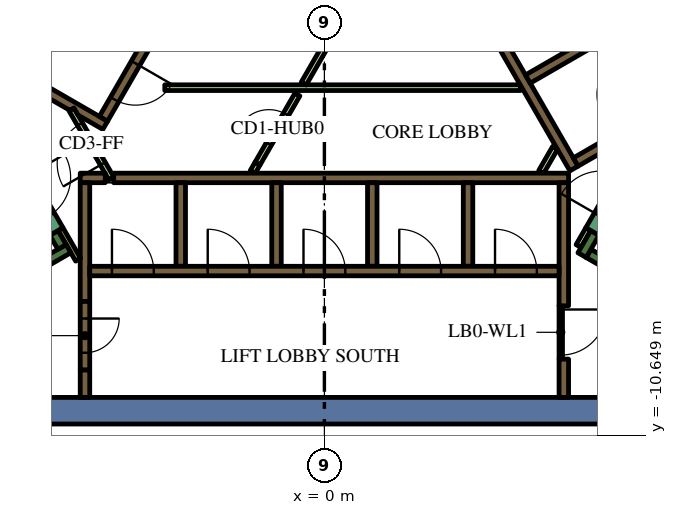
"""IFC4 building model, lengths in metres.
Left out: names, types, materials, properties, quantities, classifications, styles, units other than length and angle.
Written with IfcOpenShell. Run it as: python <this file> out.ifc"""

import sys

from ifc_helpers import new_model, si_unit, direction, frame, frame_2d, origin, place, context, subcontext, project, spatial, polyline, rectangle, outline, extrude, element, fill, save


model = new_model("IFC4")
c1 = context("Model", 3, precision=1e-05, world=origin(), true_north=direction((0.0, 1.0)))
c2 = subcontext(c1, "Body", "Model", "MODEL_VIEW")
j1 = project(units=[si_unit("LENGTHUNIT", "METRE"), si_unit("PLANEANGLEUNIT", "RADIAN")], contexts=[c1])
p1 = place(None, origin())
s1 = spatial("IfcSite", under=j1, at=p1, CompositionType="ELEMENT")
p2 = place(p1, origin())
s2 = spatial("IfcBuilding", under=s1, at=p2, CompositionType="ELEMENT")
p3 = place(p2, frame((0.0, 0.0, 247.8)))
s3 = spatial("IfcBuildingStorey", under=s2, at=p3, CompositionType="ELEMENT", Elevation=247.8)
p4 = place(p3, frame((8.904, -10.0, 0.0), z_axis=(0.0, 0.0, 1.0), x_axis=(-1.0, 0.0, 0.0)))
e1 = element("IfcWall", 1, at=p4, inside=s3, PredefinedType="SOLIDWALL", context=c2, shape_type="SweptSolid", body=[
    extrude(rectangle(XDim=22.226, YDim=0.7, at=frame_2d((11.113, 0.0))), origin(), (0.0, 0.0, 1.0), 4.2),
])
p5 = place(p3, frame((-12.625, -1.867, 0.0), z_axis=(0.0, 0.0, 1.0), x_axis=(0.499996974394, 0.866027150612, 0.0)))
e2 = element("IfcWall", 2, at=p5, inside=s3, PredefinedType="SOLIDWALL", context=c2, shape_type="SweptSolid", body=[
    extrude(rectangle(XDim=15.858, YDim=0.7, at=frame_2d((7.929, 0.0))), origin(), (0.0, 0.0, 1.0), 4.2),
])
p6 = place(p3, frame((12.84, -9.261, 0.0), z_axis=(0.0, 0.0, 1.0), x_axis=(-0.866013990052, 0.500019768644, 0.0)))
e3 = element("IfcWall", 3, at=p6, inside=s3, PredefinedType="SOLIDWALL", context=c2, shape_type="SweptSolid", body=[
    extrude(rectangle(XDim=6.8, YDim=0.25, at=frame_2d((3.4, 0.0))), origin(), (0.0, 0.0, 1.0), 4.2),
])
p7 = place(p3, frame((6.78, -5.906, 0.0), z_axis=(0.0, 0.0, 1.0), x_axis=(0.500223362819, 0.865896406789, 0.0)))
e4 = element("IfcWall", 4, at=p7, inside=s3, PredefinedType="SOLIDWALL", context=c2, shape_type="SweptSolid", body=[
    extrude(rectangle(XDim=0.675, YDim=0.25, at=frame_2d((0.337, 0.0))), origin(), (0.0, 0.0, 1.0), 4.2),
])
p8 = place(p3, frame((-12.84, -9.261, 0.0), z_axis=(0.0, 0.0, 1.0), x_axis=(0.866016039709, 0.500016218704, 0.0)))
e5 = element("IfcWall", 5, at=p8, inside=s3, PredefinedType="SOLIDWALL", context=c2, shape_type="SweptSolid", body=[
    extrude(rectangle(XDim=7.05, YDim=0.25, at=frame_2d((3.525, 0.0))), origin(), (0.0, 0.0, 1.0), 4.2),
])
p9 = place(p3, frame((-6.905, -5.69, 0.0), z_axis=(0.0, 0.0, 1.0), x_axis=(-0.500402024738, 0.865793170242, 0.0)))
e6 = element("IfcWall", 6, at=p9, inside=s3, PredefinedType="SOLIDWALL", context=c2, shape_type="SweptSolid", body=[
    extrude(rectangle(XDim=0.425, YDim=0.25, at=frame_2d((0.212, 0.0))), origin(), (0.0, 0.0, 1.0), 4.2),
])
p10 = place(p3, frame((-6.3, -8.925, 0.0), z_axis=(0.0, 0.0, 1.0), x_axis=(0.0, -1.0, 0.0)))
e7 = element("IfcWall", 7, at=p10, inside=s3, PredefinedType="SOLIDWALL", context=c2, shape_type="SweptSolid", body=[
    extrude(rectangle(XDim=0.725, YDim=0.25, at=frame_2d((0.363, 0.0))), origin(), (0.0, 0.0, 1.0), 4.2),
])
p11 = place(p3, frame((-5.545, -3.875, 0.0), z_axis=(0.0, 0.0, 1.0), x_axis=(1.0, 0.0, 0.0)))
e8 = element("IfcWall", 8, at=p11, inside=s3, PredefinedType="SOLIDWALL", context=c2, shape_type="SweptSolid", body=[
    extrude(rectangle(XDim=11.97, YDim=0.25, at=frame_2d((5.985, 0.0))), origin(), (0.0, 0.0, 1.0), 4.2),
])
p12 = place(p3, frame((-6.425, -3.875, 0.0), z_axis=(0.0, 0.0, 1.0), x_axis=(1.0, 0.0, 0.0)))
e9 = element("IfcWall", 9, at=p12, inside=s3, PredefinedType="SOLIDWALL", context=c2, shape_type="SweptSolid", body=[
    extrude(rectangle(XDim=0.658, YDim=0.25, at=frame_2d((0.329, 0.0))), origin(), (0.0, 0.0, 1.0), 4.2),
])
p13 = place(p3, frame((6.3, -7.24, 0.0), z_axis=(0.0, 0.0, 1.0), x_axis=(0.0, 1.0, 0.0)))
e10 = element("IfcWall", 10, at=p13, inside=s3, PredefinedType="SOLIDWALL", context=c2, shape_type="SweptSolid", body=[
    extrude(rectangle(XDim=3.24, YDim=0.25, at=frame_2d((1.62, 0.0))), origin(), (0.0, 0.0, 1.0), 4.2),
])
p14 = place(p3, frame((6.3, -9.65, 0.0), z_axis=(0.0, 0.0, 1.0), x_axis=(0.0, 1.0, 0.0)))
e11 = element("IfcWall", 11, at=p14, inside=s3, PredefinedType="SOLIDWALL", context=c2, shape_type="SweptSolid", body=[
    extrude(rectangle(XDim=1.008, YDim=0.25, at=frame_2d((0.504, 0.0))), origin(), (0.0, 0.0, 1.0), 4.2),
])
for number, where, z_axis, x_axis in (
    (12, (3.78, -4.0, 0.0), (0.0, 0.0, 1.0), (0.0, -1.0, 0.0)),
    (13, (1.26, -4.0, 0.0), (0.0, 0.0, 1.0), (0.0, -1.0, 0.0)),
    (14, (-1.26, -4.0, 0.0), (0.0, 0.0, 1.0), (0.0, -1.0, 0.0)),
    (15, (-3.78, -4.0, 0.0), (0.0, 0.0, 1.0), (0.0, -1.0, 0.0)),
):
    element("IfcWall", number, at=place(p3, frame(where, z_axis=z_axis, x_axis=x_axis)), inside=s3, PredefinedType="SOLIDWALL", context=c2, shape_type="SweptSolid", body=[
        extrude(rectangle(XDim=2.2, YDim=0.25, at=frame_2d((1.1, 0.0))), origin(), (0.0, 0.0, 1.0), 4.2),
    ])
p15 = place(p3, frame((-6.3, -7.125, 0.0), z_axis=(0.0, 0.0, 1.0), x_axis=(0.0, 1.0, 0.0)))
e16 = element("IfcWall", 16, at=p15, inside=s3, PredefinedType="SOLIDWALL", context=c2, shape_type="SweptSolid", body=[
    extrude(rectangle(XDim=3.125, YDim=0.25, at=frame_2d((1.562, 0.0))), origin(), (0.0, 0.0, 1.0), 4.2),
])
p16 = place(p3, frame((6.568, -3.627, 0.0), z_axis=(0.0, 0.0, 1.0), x_axis=(-0.499999455981, 0.866025717874, 0.0)))
e17 = element("IfcWall", 17, at=p16, inside=s3, PredefinedType="SOLIDWALL", context=c2, shape_type="SweptSolid", body=[
    extrude(rectangle(XDim=11.978, YDim=0.25, at=frame_2d((5.989, 0.0))), origin(), (0.0, 0.0, 1.0), 4.2),
])
p17 = place(p3, frame((5.354, -1.274, 0.0), z_axis=(0.0, 0.0, 1.0), x_axis=(0.866008176907, 0.50002983664, 0.0)))
e18 = element("IfcWall", 18, at=p17, inside=s3, PredefinedType="SOLIDWALL", context=c2, shape_type="SweptSolid", body=[
    extrude(rectangle(XDim=2.2, YDim=0.25, at=frame_2d((1.1, 0.0))), origin(), (0.0, 0.0, 1.0), 4.2),
])
p18 = place(p3, frame((6.614, -3.456, 0.0), z_axis=(0.0, 0.0, 1.0), x_axis=(0.866025089694, 0.500000544019, 0.0)))
e19 = element("IfcWall", 19, at=p18, inside=s3, PredefinedType="SOLIDWALL", context=c2, shape_type="SweptSolid", body=[
    extrude(rectangle(XDim=2.305, YDim=0.25, at=frame_2d((1.153, 0.0))), origin(), (0.0, 0.0, 1.0), 4.2),
])
p19 = place(p3, frame((-8.06, -1.311, 0.0), z_axis=(0.0, 0.0, 1.0), x_axis=(0.50000273126, 0.866023826885, 0.0)))
e20 = element("IfcWall", 20, at=p19, inside=s3, PredefinedType="SOLIDWALL", context=c2, shape_type="SweptSolid", body=[
    extrude(rectangle(XDim=10.33, YDim=0.25, at=frame_2d((5.165, 0.0))), origin(), (0.0, 0.0, 1.0), 4.2),
])
p20 = place(p3, origin())
e21 = element("IfcWall", 21, at=p20, inside=s3, PredefinedType="SOLIDWALL", context=c2, shape_type="SweptSolid", body=[
    extrude(outline(polyline([(-5.922, -2.257), (-5.922, -2.257), (-5.705, -2.382), (-5.83, -2.598), (-6.483, -2.221), (-6.591, -2.033), (-6.591, -2.033), (-6.7, -2.096), (-7.952, -1.373), (-7.827, -1.156), (-5.922, -2.257)])), origin(), (0.0, 0.0, 1.0), 4.2),
])
p21 = place(p3, frame((-6.48, -6.027, 0.0), z_axis=(0.0, 0.0, 1.0), x_axis=(-0.499927229454, 0.866067413802, 0.0)))
e22 = element("IfcWall", 22, at=p21, inside=s3, PredefinedType="PARTITIONING", context=c2, shape_type="SweptSolid", body=[
    extrude(rectangle(XDim=0.929, YDim=0.15, at=frame_2d((0.464, 0.0))), origin(), (0.0, 0.0, 1.0), 4.2),
])
p22 = place(p3, frame((6.945, -5.222, 0.0), z_axis=(0.0, 0.0, 1.0), x_axis=(-0.499818422106, -0.866130212453, 0.0)))
e23 = element("IfcWall", 23, at=p22, inside=s3, PredefinedType="PARTITIONING", context=c2, shape_type="SweptSolid", body=[
    extrude(rectangle(XDim=0.514, YDim=0.15, at=frame_2d((0.257, 0.0))), origin(), (0.0, 0.0, 1.0), 3.45),
])
p23 = place(p3, frame((5.705, -3.718, 0.0), z_axis=(0.0, 0.0, 1.0), x_axis=(0.499962090823, 0.866047289552, 0.0)))
e24 = element("IfcWall", 24, at=p23, inside=s3, PredefinedType="PARTITIONING", context=c2, shape_type="SweptSolid", body=[
    extrude(rectangle(XDim=0.735, YDim=0.15, at=frame_2d((0.367, 0.0))), origin(), (0.0, 0.0, 1.0), 3.45),
])
p24 = place(p3, frame((-4.2, -1.5, 0.0), z_axis=(0.0, 0.0, 1.0), x_axis=(1.0, 0.0, 0.0)))
e25 = element("IfcWall", 25, at=p24, inside=s3, PredefinedType="PARTITIONING", context=c2, shape_type="SweptSolid", body=[
    extrude(rectangle(XDim=9.359, YDim=0.15, at=frame_2d((4.68, 0.0))), origin(), (0.0, 0.0, 1.0), 3.45),
])
p25 = place(p3, frame((-0.544, -1.393, 0.0), z_axis=(0.0, 0.0, 1.0), x_axis=(0.499928740635, 0.866066541489, 0.0)))
e26 = element("IfcWall", 26, at=p25, inside=s3, PredefinedType="PARTITIONING", context=c2, shape_type="SweptSolid", body=[
    extrude(rectangle(XDim=1.912, YDim=0.15, at=frame_2d((0.956, 0.0))), origin(), (0.0, 0.0, 1.0), 3.45),
])
p26 = place(p3, frame((-1.887, -3.718, 0.0), z_axis=(0.0, 0.0, 1.0), x_axis=(0.500165633897, 0.865929753888, 0.0)))
e27 = element("IfcWall", 27, at=p26, inside=s3, PredefinedType="PARTITIONING", context=c2, shape_type="SweptSolid", body=[
    extrude(rectangle(XDim=0.254, YDim=0.15, at=frame_2d((0.127, 0.0))), origin(), (0.0, 0.0, 1.0), 3.45),
])
p27 = place(p3, frame((-6.175, -6.325, 0.0), z_axis=(0.0, 0.0, 1.0), x_axis=(1.0, 0.0, 0.0)))
e28 = element("IfcWall", 28, at=p27, inside=s3, PredefinedType="SOLIDWALL", context=c2, shape_type="SweptSolid", body=[
    extrude(rectangle(XDim=12.35, YDim=0.25, at=frame_2d((6.175, 0.0))), origin(), (0.0, 0.0, 1.0), 4.2),
])
p28 = place(p27, frame((0.585, 0.0, 0.0)))
e29 = element("IfcOpeningElement", 29, at=p28, cuts=e28, PredefinedType="OPENING", context=c2, shape_type="SweptSolid", body=[
    extrude(rectangle(XDim=1.1, YDim=2.1, at=frame_2d((0.55, 1.05))), frame((0.0, 0.135, 0.0), z_axis=(0.0, -1.0, 0.0), x_axis=(1.0, 0.0, 0.0)), (0.0, 0.0, 1.0), 0.27),
])
p29 = place(p27, frame((3.105, 0.0, 0.0)))
e30 = element("IfcOpeningElement", 30, at=p29, cuts=e28, PredefinedType="OPENING", context=c2, shape_type="SweptSolid", body=[
    extrude(rectangle(XDim=1.1, YDim=2.1, at=frame_2d((0.55, 1.05))), frame((0.0, 0.135, 0.0), z_axis=(0.0, -1.0, 0.0), x_axis=(1.0, 0.0, 0.0)), (0.0, 0.0, 1.0), 0.27),
])
p30 = place(p27, frame((5.625, 0.0, 0.0)))
e31 = element("IfcOpeningElement", 31, at=p30, cuts=e28, PredefinedType="OPENING", context=c2, shape_type="SweptSolid", body=[
    extrude(rectangle(XDim=1.1, YDim=2.1, at=frame_2d((0.55, 1.05))), frame((0.0, 0.135, 0.0), z_axis=(0.0, -1.0, 0.0), x_axis=(1.0, 0.0, 0.0)), (0.0, 0.0, 1.0), 0.27),
])
p31 = place(p27, frame((8.145, 0.0, 0.0)))
e32 = element("IfcOpeningElement", 32, at=p31, cuts=e28, PredefinedType="OPENING", context=c2, shape_type="SweptSolid", body=[
    extrude(rectangle(XDim=1.1, YDim=2.1, at=frame_2d((0.55, 1.05))), frame((0.0, 0.135, 0.0), z_axis=(0.0, -1.0, 0.0), x_axis=(1.0, 0.0, 0.0)), (0.0, 0.0, 1.0), 0.27),
])
p32 = place(p27, frame((10.665, 0.0, 0.0)))
e33 = element("IfcOpeningElement", 33, at=p32, cuts=e28, PredefinedType="OPENING", context=c2, shape_type="SweptSolid", body=[
    extrude(rectangle(XDim=1.1, YDim=2.1, at=frame_2d((0.55, 1.05))), frame((0.0, 0.135, 0.0), z_axis=(0.0, -1.0, 0.0), x_axis=(1.0, 0.0, 0.0)), (0.0, 0.0, 1.0), 0.27),
])
p33 = place(p3, frame((8.565, -2.185, 0.0), z_axis=(0.0, 0.0, 1.0), x_axis=(-0.499997954832, 0.866026584559, 0.0)))
e34 = element("IfcWall", 34, at=p33, inside=s3, PredefinedType="SOLIDWALL", context=c2, shape_type="SweptSolid", body=[
    extrude(rectangle(XDim=12.35, YDim=0.25, at=frame_2d((6.175, 0.0))), origin(), (0.0, 0.0, 1.0), 4.2),
])
p34 = place(p33, frame((0.585, 0.0, 0.0)))
e35 = element("IfcOpeningElement", 35, at=p34, cuts=e34, PredefinedType="OPENING", context=c2, shape_type="SweptSolid", body=[
    extrude(rectangle(XDim=1.1, YDim=2.1, at=frame_2d((0.55, 1.05))), frame((0.0, 0.135, 0.0), z_axis=(0.0, -1.0, 0.0), x_axis=(1.0, 0.0, 0.0)), (0.0, 0.0, 1.0), 0.27),
])
p35 = place(p3, frame((-0.898, 6.194, 0.0), z_axis=(0.0, 0.0, 1.0), x_axis=(-0.499996202215, -0.866027596426, 0.0)))
e36 = element("IfcWall", 36, at=p35, inside=s3, PredefinedType="SOLIDWALL", context=c2, shape_type="SweptSolid", body=[
    extrude(rectangle(XDim=9.83, YDim=0.25, at=frame_2d((4.915, 0.0))), origin(), (0.0, 0.0, 1.0), 4.2),
])
p36 = place(p35, frame((0.585, 0.0, 0.0)))
e37 = element("IfcOpeningElement", 37, at=p36, cuts=e36, PredefinedType="OPENING", context=c2, shape_type="SweptSolid", body=[
    extrude(rectangle(XDim=1.1, YDim=2.1, at=frame_2d((0.55, 1.05))), frame((0.0, 0.135, 0.0), z_axis=(0.0, -1.0, 0.0), x_axis=(1.0, 0.0, 0.0)), (0.0, 0.0, 1.0), 0.27),
])
p37 = place(p35, frame((3.105, 0.0, 0.0)))
e38 = element("IfcOpeningElement", 38, at=p37, cuts=e36, PredefinedType="OPENING", context=c2, shape_type="SweptSolid", body=[
    extrude(rectangle(XDim=1.1, YDim=2.1, at=frame_2d((0.55, 1.05))), frame((0.0, 0.135, 0.0), z_axis=(0.0, -1.0, 0.0), x_axis=(1.0, 0.0, 0.0)), (0.0, 0.0, 1.0), 0.27),
])
p38 = place(p35, frame((5.625, 0.0, 0.0)))
e39 = element("IfcOpeningElement", 39, at=p38, cuts=e36, PredefinedType="OPENING", context=c2, shape_type="SweptSolid", body=[
    extrude(rectangle(XDim=1.1, YDim=2.1, at=frame_2d((0.55, 1.05))), frame((0.0, 0.135, 0.0), z_axis=(0.0, -1.0, 0.0), x_axis=(1.0, 0.0, 0.0)), (0.0, 0.0, 1.0), 0.27),
])
p39 = place(p35, frame((8.145, 0.0, 0.0)))
e40 = element("IfcOpeningElement", 40, at=p39, cuts=e36, PredefinedType="OPENING", context=c2, shape_type="SweptSolid", body=[
    extrude(rectangle(XDim=1.1, YDim=2.1, at=frame_2d((0.55, 1.05))), frame((0.0, 0.135, 0.0), z_axis=(0.0, -1.0, 0.0), x_axis=(1.0, 0.0, 0.0)), (0.0, 0.0, 1.0), 0.27),
])
p40 = place(p3, frame((7.053, -5.284, 0.0), z_axis=(0.0, 0.0, 1.0), x_axis=(0.500078061341, 0.865980330357, 0.0)))
e41 = element("IfcWall", 41, at=p40, inside=s3, PredefinedType="SOLIDWALL", context=c2, shape_type="SweptSolid", body=[
    extrude(rectangle(XDim=2.1, YDim=0.4, at=frame_2d((1.05, 0.0))), origin(), (0.0, 0.0, 1.0), 4.2),
])
p41 = place(p40, frame((0.45, 0.0, 0.0)))
e42 = element("IfcOpeningElement", 42, at=p41, cuts=e41, PredefinedType="OPENING", context=c2, shape_type="SweptSolid", body=[
    extrude(rectangle(XDim=1.2, YDim=2.1, at=frame_2d((0.6, 1.05))), frame((0.0, 0.21, 0.0), z_axis=(0.0, -1.0, 0.0), x_axis=(1.0, 0.0, 0.0)), (0.0, 0.0, 1.0), 0.42),
])
p42 = place(p3, frame((-8.103, -3.466, 0.0), z_axis=(0.0, 0.0, 1.0), x_axis=(0.500078061341, -0.865980330357, 0.0)))
e43 = element("IfcWall", 43, at=p42, inside=s3, PredefinedType="SOLIDWALL", context=c2, shape_type="SweptSolid", body=[
    extrude(rectangle(XDim=2.1, YDim=0.4, at=frame_2d((1.05, 0.0))), origin(), (0.0, 0.0, 1.0), 4.2),
])
p43 = place(p42, frame((0.45, 0.0, 0.0)))
e44 = element("IfcOpeningElement", 44, at=p43, cuts=e43, PredefinedType="OPENING", context=c2, shape_type="SweptSolid", body=[
    extrude(rectangle(XDim=1.2, YDim=2.1, at=frame_2d((0.6, 1.05))), frame((0.0, 0.21, 0.0), z_axis=(0.0, -1.0, 0.0), x_axis=(1.0, 0.0, 0.0)), (0.0, 0.0, 1.0), 0.42),
])
p44 = place(p3, frame((-6.3, -7.125, 0.0), z_axis=(0.0, 0.0, 1.0), x_axis=(0.0, -1.0, 0.0)))
e45 = element("IfcWall", 45, at=p44, inside=s3, PredefinedType="SOLIDWALL", context=c2, shape_type="SweptSolid", body=[
    extrude(rectangle(XDim=1.8, YDim=0.25, at=frame_2d((0.9, 0.0))), origin(), (0.0, 0.0, 1.0), 4.2),
])
p45 = place(p44, frame((0.45, 0.0, 0.0)))
e46 = element("IfcOpeningElement", 46, at=p45, cuts=e45, PredefinedType="OPENING", context=c2, shape_type="SweptSolid", body=[
    extrude(rectangle(XDim=0.9, YDim=2.1, at=frame_2d((0.45, 1.05))), frame((0.0, 0.135, 0.0), z_axis=(0.0, -1.0, 0.0), x_axis=(1.0, 0.0, 0.0)), (0.0, 0.0, 1.0), 0.27),
])
p46 = place(p3, frame((-1.76, -3.498, 0.0), z_axis=(0.0, 0.0, 1.0), x_axis=(0.499977374825, 0.866038466041, 0.0)))
e47 = element("IfcWall", 47, at=p46, inside=s3, PredefinedType="PARTITIONING", context=c2, shape_type="SweptSolid", body=[
    extrude(rectangle(XDim=2.1, YDim=0.15, at=frame_2d((1.05, 0.0))), origin(), (0.0, 0.0, 1.0), 3.45),
])
p47 = place(p46, frame((0.6, 0.0, 0.0)))
e48 = element("IfcOpeningElement", 48, at=p47, cuts=e47, PredefinedType="OPENING", context=c2, shape_type="SweptSolid", body=[
    extrude(rectangle(XDim=0.9, YDim=2.1, at=frame_2d((0.45, 1.05))), frame((0.0, 0.085, 0.0), z_axis=(0.0, -1.0, 0.0), x_axis=(1.0, 0.0, 0.0)), (0.0, 0.0, 1.0), 0.17),
])
p48 = place(p3, frame((-5.606, -3.89, 0.0), z_axis=(0.0, 0.0, 1.0), x_axis=(-0.500027713859, 0.866009402589, 0.0)))
e49 = element("IfcWall", 49, at=p48, inside=s3, PredefinedType="PARTITIONING", context=c2, shape_type="SweptSolid", body=[
    extrude(rectangle(XDim=2.1, YDim=0.15, at=frame_2d((1.05, 0.0))), origin(), (0.0, 0.0, 1.0), 3.45),
])
p49 = place(p48, frame((0.45, 0.0, 0.0)))
e50 = element("IfcOpeningElement", 50, at=p49, cuts=e49, PredefinedType="OPENING", context=c2, shape_type="SweptSolid", body=[
    extrude(rectangle(XDim=1.2, YDim=2.1, at=frame_2d((0.6, 1.05))), frame((0.0, 0.085, 0.0), z_axis=(0.0, -1.0, 0.0), x_axis=(1.0, 0.0, 0.0)), (0.0, 0.0, 1.0), 0.17),
])
p50 = place(p3, frame((6.22, -7.237, 0.0), z_axis=(0.0, 0.0, 1.0), x_axis=(0.0, -1.0, 0.0)))
e51 = element("IfcWall", 51, at=p50, inside=s3, PredefinedType="PARTITIONING", context=c2, shape_type="SweptSolid", body=[
    extrude(rectangle(XDim=1.4, YDim=0.09, at=frame_2d((0.7, 0.0))), origin(), (0.0, 0.0, 1.0), 3.45),
])
p51 = place(p50, frame((0.1, 0.0, 0.0)))
e52 = element("IfcOpeningElement", 52, at=p51, cuts=e51, PredefinedType="OPENING", context=c2, shape_type="SweptSolid", body=[
    extrude(rectangle(XDim=1.2, YDim=2.1, at=frame_2d((0.6, 1.05))), frame((0.0, 0.055, 0.0), z_axis=(0.0, -1.0, 0.0), x_axis=(1.0, 0.0, 0.0)), (0.0, 0.0, 1.0), 0.11),
])
p52 = place(p28, origin())
e53 = element("IfcDoor", 53, at=p52, inside=s3, OperationType="DOUBLE_DOOR_SLIDING", PredefinedType="DOOR", context=c2, shape_type="SweptSolid", body=[
    extrude(rectangle(XDim=1.1, YDim=2.1, at=frame_2d((0.55, 1.05))), frame((0.0, 0.025, 0.0), z_axis=(0.0, -1.0, 0.0), x_axis=(1.0, 0.0, 0.0)), (0.0, 0.0, 1.0), 0.05),
])
fill(e29, e53)
p53 = place(p29, origin())
e54 = element("IfcDoor", 54, at=p53, inside=s3, OperationType="DOUBLE_DOOR_SLIDING", PredefinedType="DOOR", context=c2, shape_type="SweptSolid", body=[
    extrude(rectangle(XDim=1.1, YDim=2.1, at=frame_2d((0.55, 1.05))), frame((0.0, 0.025, 0.0), z_axis=(0.0, -1.0, 0.0), x_axis=(1.0, 0.0, 0.0)), (0.0, 0.0, 1.0), 0.05),
])
fill(e30, e54)
p54 = place(p30, origin())
e55 = element("IfcDoor", 55, at=p54, inside=s3, OperationType="DOUBLE_DOOR_SLIDING", PredefinedType="DOOR", context=c2, shape_type="SweptSolid", body=[
    extrude(rectangle(XDim=1.1, YDim=2.1, at=frame_2d((0.55, 1.05))), frame((0.0, 0.025, 0.0), z_axis=(0.0, -1.0, 0.0), x_axis=(1.0, 0.0, 0.0)), (0.0, 0.0, 1.0), 0.05),
])
fill(e31, e55)
p55 = place(p31, origin())
e56 = element("IfcDoor", 56, at=p55, inside=s3, OperationType="DOUBLE_DOOR_SLIDING", PredefinedType="DOOR", context=c2, shape_type="SweptSolid", body=[
    extrude(rectangle(XDim=1.1, YDim=2.1, at=frame_2d((0.55, 1.05))), frame((0.0, 0.025, 0.0), z_axis=(0.0, -1.0, 0.0), x_axis=(1.0, 0.0, 0.0)), (0.0, 0.0, 1.0), 0.05),
])
fill(e32, e56)
p56 = place(p32, origin())
e57 = element("IfcDoor", 57, at=p56, inside=s3, OperationType="DOUBLE_DOOR_SLIDING", PredefinedType="DOOR", context=c2, shape_type="SweptSolid", body=[
    extrude(rectangle(XDim=1.1, YDim=2.1, at=frame_2d((0.55, 1.05))), frame((0.0, 0.025, 0.0), z_axis=(0.0, -1.0, 0.0), x_axis=(1.0, 0.0, 0.0)), (0.0, 0.0, 1.0), 0.05),
])
fill(e33, e57)
p57 = place(p39, origin())
e58 = element("IfcDoor", 58, at=p57, inside=s3, OperationType="DOUBLE_DOOR_SLIDING", PredefinedType="DOOR", context=c2, shape_type="SweptSolid", body=[
    extrude(rectangle(XDim=1.1, YDim=2.1, at=frame_2d((0.55, 1.05))), frame((0.0, 0.025, 0.0), z_axis=(0.0, -1.0, 0.0), x_axis=(1.0, 0.0, 0.0)), (0.0, 0.0, 1.0), 0.05),
])
fill(e40, e58)
p58 = place(p45, origin())
e59 = element("IfcDoor", 59, at=p58, inside=s3, OperationType="SINGLE_SWING_LEFT", PredefinedType="DOOR", context=c2, shape_type="SweptSolid", body=[
    extrude(rectangle(XDim=0.9, YDim=2.1, at=frame_2d((0.45, 1.05))), frame((0.0, 0.025, 0.0), z_axis=(0.0, -1.0, 0.0), x_axis=(1.0, 0.0, 0.0)), (0.0, 0.0, 1.0), 0.05),
])
fill(e46, e59)
p59 = place(p47, origin())
e60 = element("IfcDoor", 60, at=p59, inside=s3, OperationType="SINGLE_SWING_LEFT", PredefinedType="DOOR", context=c2, shape_type="SweptSolid", body=[
    extrude(rectangle(XDim=0.9, YDim=2.1, at=frame_2d((0.45, 1.05))), frame((0.0, 0.025, 0.0), z_axis=(0.0, -1.0, 0.0), x_axis=(1.0, 0.0, 0.0)), (0.0, 0.0, 1.0), 0.05),
])
fill(e48, e60)
p60 = place(p49, origin())
e61 = element("IfcDoor", 61, at=p60, inside=s3, OperationType="SINGLE_SWING_LEFT", PredefinedType="DOOR", context=c2, shape_type="SweptSolid", body=[
    extrude(rectangle(XDim=1.2, YDim=2.1, at=frame_2d((0.6, 1.05))), frame((0.0, 0.025, 0.0), z_axis=(0.0, -1.0, 0.0), x_axis=(1.0, 0.0, 0.0)), (0.0, 0.0, 1.0), 0.05),
])
fill(e50, e61)
p61 = place(p51, origin())
e62 = element("IfcDoor", 62, at=p61, inside=s3, OperationType="SINGLE_SWING_LEFT", PredefinedType="DOOR", context=c2, shape_type="SweptSolid", body=[
    extrude(rectangle(XDim=1.2, YDim=2.1, at=frame_2d((0.6, 1.05))), frame((0.0, 0.025, 0.0), z_axis=(0.0, -1.0, 0.0), x_axis=(1.0, 0.0, 0.0)), (0.0, 0.0, 1.0), 0.05),
])
fill(e52, e62)
save(model, sys.argv[1])
